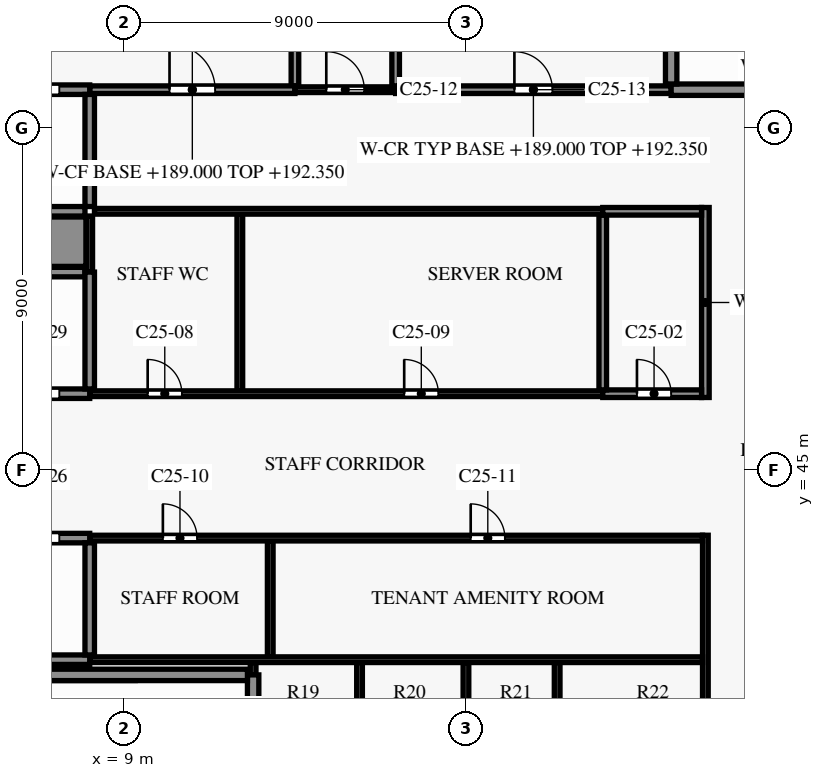
"""IFC4 building model, lengths in metres.
Left out: names, types, materials, properties, quantities, classifications, styles, units other than length and angle.
Written with IfcOpenShell. Run it as: python <this file> out.ifc"""

import sys

from ifc_helpers import new_model, si_unit, direction, frame, frame_2d, origin, place, context, subcontext, project, spatial, rectangle, extrude, element, fill, save


model = new_model("IFC4")
c1 = context("Model", 3, precision=1e-05, world=origin(), true_north=direction((0.0, 1.0)))
c2 = subcontext(c1, "Body", "Model", "MODEL_VIEW")
j1 = project(units=[si_unit("LENGTHUNIT", "METRE"), si_unit("PLANEANGLEUNIT", "RADIAN")], contexts=[c1])
p1 = place(None, origin())
s1 = spatial("IfcSite", under=j1, at=p1, CompositionType="ELEMENT")
p2 = place(p1, origin())
s2 = spatial("IfcBuilding", under=s1, at=p2, CompositionType="ELEMENT")
p3 = place(p2, frame((0.0, 0.0, 189.0)))
s3 = spatial("IfcBuildingStorey", under=s2, at=p3, CompositionType="ELEMENT", Elevation=189.0)
p4 = place(p3, frame((4.55, 39.6, 0.0), z_axis=(0.0, 0.0, 1.0), x_axis=(1.0, 0.0, 0.0)))
e1 = element("IfcWall", 1, at=p4, inside=s3, PredefinedType="SHEAR", context=c2, shape_type="SweptSolid", body=[
    extrude(rectangle(XDim=7.7, YDim=0.3, at=frame_2d((3.85, 0.0))), origin(), (0.0, 0.0, 1.0), 3.5),
])
p5 = place(p3, frame((8.1, 40.0, 0.0), z_axis=(0.0, 0.0, 1.0), x_axis=(1.0, 0.0, 0.0)))
e2 = element("IfcWall", 2, at=p5, inside=s3, PredefinedType="PARTITIONING", context=c2, shape_type="SweptSolid", body=[
    extrude(rectangle(XDim=16.125, YDim=0.15, at=frame_2d((8.062, 0.0))), origin(), (0.0, 0.0, 1.0), 3.35),
])
p6 = place(p3, frame((0.15, 40.0, 0.0), z_axis=(0.0, 0.0, 1.0), x_axis=(1.0, 0.0, 0.0)))
e3 = element("IfcWall", 3, at=p6, inside=s3, PredefinedType="SHEAR", context=c2, shape_type="SweptSolid", body=[
    extrude(rectangle(XDim=7.95, YDim=0.25, at=frame_2d((3.975, 0.0))), origin(), (0.0, 0.0, 1.0), 3.5),
])
p7 = place(p3, frame((8.1, 43.2, 0.0), z_axis=(0.0, 0.0, 1.0), x_axis=(1.0, 0.0, 0.0)))
e4 = element("IfcWall", 4, at=p7, inside=s3, PredefinedType="PARTITIONING", context=c2, shape_type="SweptSolid", body=[
    extrude(rectangle(XDim=16.125, YDim=0.15, at=frame_2d((8.062, 0.0))), origin(), (0.0, 0.0, 1.0), 3.35),
])
p8 = place(p7, frame((1.925, 0.0, 0.0)))
e5 = element("IfcOpeningElement", 5, at=p8, cuts=e4, PredefinedType="OPENING", context=c2, shape_type="SweptSolid", body=[
    extrude(rectangle(XDim=0.9, YDim=2.1, at=frame_2d((0.45, 1.05))), frame((0.0, 0.085, 0.0), z_axis=(0.0, -1.0, 0.0), x_axis=(1.0, 0.0, 0.0)), (0.0, 0.0, 1.0), 0.17),
])
p9 = place(p7, frame((10.025, 0.0, 0.0)))
e6 = element("IfcOpeningElement", 6, at=p9, cuts=e4, PredefinedType="OPENING", context=c2, shape_type="SweptSolid", body=[
    extrude(rectangle(XDim=0.9, YDim=2.1, at=frame_2d((0.45, 1.05))), frame((0.0, 0.085, 0.0), z_axis=(0.0, -1.0, 0.0), x_axis=(1.0, 0.0, 0.0)), (0.0, 0.0, 1.0), 0.17),
])
p10 = place(p3, frame((0.125, 43.2, 0.0), z_axis=(0.0, 0.0, 1.0), x_axis=(1.0, 0.0, 0.0)))
e7 = element("IfcWall", 7, at=p10, inside=s3, PredefinedType="SHEAR", context=c2, shape_type="SweptSolid", body=[
    extrude(rectangle(XDim=7.975, YDim=0.25, at=frame_2d((3.988, 0.0))), origin(), (0.0, 0.0, 1.0), 3.5),
])
p11 = place(p10, frame((0.675, 0.0, 0.0)))
e8 = element("IfcOpeningElement", 8, at=p11, cuts=e7, PredefinedType="OPENING", context=c2, shape_type="SweptSolid", body=[
    extrude(rectangle(XDim=1.1, YDim=2.1, at=frame_2d((0.55, 1.05))), frame((0.0, 0.135, 0.0), z_axis=(0.0, -1.0, 0.0), x_axis=(1.0, 0.0, 0.0)), (0.0, 0.0, 1.0), 0.27),
])
p12 = place(p10, frame((3.375, 0.0, 0.0)))
e9 = element("IfcOpeningElement", 9, at=p12, cuts=e7, PredefinedType="OPENING", context=c2, shape_type="SweptSolid", body=[
    extrude(rectangle(XDim=1.1, YDim=2.1, at=frame_2d((0.55, 1.05))), frame((0.0, 0.135, 0.0), z_axis=(0.0, -1.0, 0.0), x_axis=(1.0, 0.0, 0.0)), (0.0, 0.0, 1.0), 0.27),
])
p13 = place(p10, frame((6.075, 0.0, 0.0)))
e10 = element("IfcOpeningElement", 10, at=p13, cuts=e7, PredefinedType="OPENING", context=c2, shape_type="SweptSolid", body=[
    extrude(rectangle(XDim=1.1, YDim=2.1, at=frame_2d((0.55, 1.05))), frame((0.0, 0.135, 0.0), z_axis=(0.0, -1.0, 0.0), x_axis=(1.0, 0.0, 0.0)), (0.0, 0.0, 1.0), 0.27),
])
p14 = place(p3, frame((8.1, 47.0, 0.0), z_axis=(0.0, 0.0, 1.0), x_axis=(1.0, 0.0, 0.0)))
e11 = element("IfcWall", 11, at=p14, inside=s3, PredefinedType="PARTITIONING", context=c2, shape_type="SweptSolid", body=[
    extrude(rectangle(XDim=13.5, YDim=0.15, at=frame_2d((6.75, 0.0))), origin(), (0.0, 0.0, 1.0), 3.35),
])
p15 = place(p14, frame((1.525, 0.0, 0.0)))
e12 = element("IfcOpeningElement", 12, at=p15, cuts=e11, PredefinedType="OPENING", context=c2, shape_type="SweptSolid", body=[
    extrude(rectangle(XDim=0.9, YDim=2.1, at=frame_2d((0.45, 1.05))), frame((0.0, 0.085, 0.0), z_axis=(0.0, -1.0, 0.0), x_axis=(1.0, 0.0, 0.0)), (0.0, 0.0, 1.0), 0.17),
])
p16 = place(p14, frame((8.275, 0.0, 0.0)))
e13 = element("IfcOpeningElement", 13, at=p16, cuts=e11, PredefinedType="OPENING", context=c2, shape_type="SweptSolid", body=[
    extrude(rectangle(XDim=0.9, YDim=2.1, at=frame_2d((0.45, 1.05))), frame((0.0, 0.085, 0.0), z_axis=(0.0, -1.0, 0.0), x_axis=(1.0, 0.0, 0.0)), (0.0, 0.0, 1.0), 0.17),
])
p17 = place(p3, frame((21.6, 47.0, 0.0), z_axis=(0.0, 0.0, 1.0), x_axis=(1.0, 0.0, 0.0)))
e14 = element("IfcWall", 14, at=p17, inside=s3, PredefinedType="PARTITIONING", context=c2, shape_type="SweptSolid", body=[
    extrude(rectangle(XDim=2.6, YDim=0.2, at=frame_2d((1.3, 0.0))), origin(), (0.0, 0.0, 1.0), 3.35),
])
p18 = place(p17, frame((0.9, 0.0, 0.0)))
e15 = element("IfcOpeningElement", 15, at=p18, cuts=e14, PredefinedType="OPENING", context=c2, shape_type="SweptSolid", body=[
    extrude(rectangle(XDim=0.9, YDim=2.1, at=frame_2d((0.45, 1.05))), frame((0.0, 0.11, 0.0), z_axis=(0.0, -1.0, 0.0), x_axis=(1.0, 0.0, 0.0)), (0.0, 0.0, 1.0), 0.22),
])
p19 = place(p3, frame((0.125, 47.0, 0.0), z_axis=(0.0, 0.0, 1.0), x_axis=(1.0, 0.0, 0.0)))
e16 = element("IfcWall", 16, at=p19, inside=s3, PredefinedType="SHEAR", context=c2, shape_type="SweptSolid", body=[
    extrude(rectangle(XDim=7.975, YDim=0.25, at=frame_2d((3.988, 0.0))), origin(), (0.0, 0.0, 1.0), 3.5),
])
p20 = place(p19, frame((0.675, 0.0, 0.0)))
e17 = element("IfcOpeningElement", 17, at=p20, cuts=e16, PredefinedType="OPENING", context=c2, shape_type="SweptSolid", body=[
    extrude(rectangle(XDim=1.1, YDim=2.1, at=frame_2d((0.55, 1.05))), frame((0.0, 0.135, 0.0), z_axis=(0.0, -1.0, 0.0), x_axis=(1.0, 0.0, 0.0)), (0.0, 0.0, 1.0), 0.27),
])
p21 = place(p19, frame((3.375, 0.0, 0.0)))
e18 = element("IfcOpeningElement", 18, at=p21, cuts=e16, PredefinedType="OPENING", context=c2, shape_type="SweptSolid", body=[
    extrude(rectangle(XDim=1.1, YDim=2.1, at=frame_2d((0.55, 1.05))), frame((0.0, 0.135, 0.0), z_axis=(0.0, -1.0, 0.0), x_axis=(1.0, 0.0, 0.0)), (0.0, 0.0, 1.0), 0.27),
])
p22 = place(p19, frame((6.075, 0.0, 0.0)))
e19 = element("IfcOpeningElement", 19, at=p22, cuts=e16, PredefinedType="OPENING", context=c2, shape_type="SweptSolid", body=[
    extrude(rectangle(XDim=1.1, YDim=2.1, at=frame_2d((0.55, 1.05))), frame((0.0, 0.135, 0.0), z_axis=(0.0, -1.0, 0.0), x_axis=(1.0, 0.0, 0.0)), (0.0, 0.0, 1.0), 0.27),
])
p23 = place(p3, frame((0.125, 50.2, 0.0), z_axis=(0.0, 0.0, 1.0), x_axis=(1.0, 0.0, 0.0)))
e20 = element("IfcWall", 20, at=p23, inside=s3, PredefinedType="SHEAR", context=c2, shape_type="SweptSolid", body=[
    extrude(rectangle(XDim=7.85, YDim=0.25, at=frame_2d((3.925, 0.0))), origin(), (0.0, 0.0, 1.0), 3.5),
])
p24 = place(p3, frame((-0.125, 51.0, 0.0), z_axis=(0.0, 0.0, 1.0), x_axis=(1.0, 0.0, 0.0)))
e21 = element("IfcWall", 21, at=p24, inside=s3, PredefinedType="SHEAR", context=c2, shape_type="SweptSolid", body=[
    extrude(rectangle(XDim=8.125, YDim=1.3, at=frame_2d((4.062, 0.0))), origin(), (0.0, 0.0, 1.0), 3.5),
])
p25 = place(p3, frame((8.225, 51.8, 0.0), z_axis=(0.0, 0.0, 1.0), x_axis=(1.0, 0.0, 0.0)))
e22 = element("IfcWall", 22, at=p25, inside=s3, PredefinedType="PARTITIONING", context=c2, shape_type="SweptSolid", body=[
    extrude(rectangle(XDim=13.375, YDim=0.15, at=frame_2d((6.688, 0.0))), origin(), (0.0, 0.0, 1.0), 3.35),
])
p26 = place(p3, frame((21.6, 51.8, 0.0), z_axis=(0.0, 0.0, 1.0), x_axis=(1.0, 0.0, 0.0)))
e23 = element("IfcWall", 23, at=p26, inside=s3, PredefinedType="PARTITIONING", context=c2, shape_type="SweptSolid", body=[
    extrude(rectangle(XDim=2.6, YDim=0.2, at=frame_2d((1.3, 0.0))), origin(), (0.0, 0.0, 1.0), 3.35),
])
p27 = place(p3, frame((0.125, 51.8, 0.0), z_axis=(0.0, 0.0, 1.0), x_axis=(1.0, 0.0, 0.0)))
e24 = element("IfcWall", 24, at=p27, inside=s3, PredefinedType="SHEAR", context=c2, shape_type="SweptSolid", body=[
    extrude(rectangle(XDim=7.85, YDim=0.25, at=frame_2d((3.925, 0.0))), origin(), (0.0, 0.0, 1.0), 3.5),
])
p28 = place(p3, frame((8.1, 55.0, 0.0), z_axis=(0.0, 0.0, 1.0), x_axis=(1.0, 0.0, 0.0)))
e25 = element("IfcWall", 25, at=p28, inside=s3, PredefinedType="PARTITIONING", context=c2, shape_type="SweptSolid", body=[
    extrude(rectangle(XDim=5.4, YDim=0.2, at=frame_2d((2.7, 0.0))), origin(), (0.0, 0.0, 1.0), 3.35),
])
p29 = place(p28, frame((2.1, 0.0, 0.0)))
e26 = element("IfcOpeningElement", 26, at=p29, cuts=e25, PredefinedType="OPENING", context=c2, shape_type="SweptSolid", body=[
    extrude(rectangle(XDim=1.2, YDim=2.2, at=frame_2d((0.6, 1.1))), frame((0.0, 0.11, 0.0), z_axis=(0.0, -1.0, 0.0), x_axis=(1.0, 0.0, 0.0)), (0.0, 0.0, 1.0), 0.22),
])
p30 = place(p3, frame((13.5, 55.0, 0.0), z_axis=(0.0, 0.0, 1.0), x_axis=(1.0, 0.0, 0.0)))
e27 = element("IfcWall", 27, at=p30, inside=s3, PredefinedType="PARTITIONING", context=c2, shape_type="SweptSolid", body=[
    extrude(rectangle(XDim=2.65, YDim=0.15, at=frame_2d((1.325, 0.0))), origin(), (0.0, 0.0, 1.0), 3.35),
])
p31 = place(p30, frame((0.825, 0.0, 0.0)))
e28 = element("IfcOpeningElement", 28, at=p31, cuts=e27, PredefinedType="OPENING", context=c2, shape_type="SweptSolid", body=[
    extrude(rectangle(XDim=1.0, YDim=2.1, at=frame_2d((0.5, 1.05))), frame((0.0, 0.085, 0.0), z_axis=(0.0, -1.0, 0.0), x_axis=(1.0, 0.0, 0.0)), (0.0, 0.0, 1.0), 0.17),
])
p32 = place(p3, frame((16.15, 55.0, 0.0), z_axis=(0.0, 0.0, 1.0), x_axis=(1.0, 0.0, 0.0)))
e29 = element("IfcWall", 29, at=p32, inside=s3, PredefinedType="PARTITIONING", context=c2, shape_type="SweptSolid", body=[
    extrude(rectangle(XDim=7.25, YDim=0.2, at=frame_2d((3.625, 0.0))), origin(), (0.0, 0.0, 1.0), 3.35),
])
p33 = place(p32, frame((3.125, 0.0, 0.0)))
e30 = element("IfcOpeningElement", 30, at=p33, cuts=e29, PredefinedType="OPENING", context=c2, shape_type="SweptSolid", body=[
    extrude(rectangle(XDim=1.0, YDim=2.1, at=frame_2d((0.5, 1.05))), frame((0.0, 0.11, 0.0), z_axis=(0.0, -1.0, 0.0), x_axis=(1.0, 0.0, 0.0)), (0.0, 0.0, 1.0), 0.22),
])
p34 = place(p3, frame((0.15, 55.0, 0.0), z_axis=(0.0, 0.0, 1.0), x_axis=(1.0, 0.0, 0.0)))
e31 = element("IfcWall", 31, at=p34, inside=s3, PredefinedType="SHEAR", context=c2, shape_type="SweptSolid", body=[
    extrude(rectangle(XDim=7.95, YDim=0.25, at=frame_2d((3.975, 0.0))), origin(), (0.0, 0.0, 1.0), 3.5),
])
p35 = place(p34, frame((0.65, 0.0, 0.0)))
e32 = element("IfcOpeningElement", 32, at=p35, cuts=e31, PredefinedType="OPENING", context=c2, shape_type="SweptSolid", body=[
    extrude(rectangle(XDim=1.1, YDim=2.1, at=frame_2d((0.55, 1.05))), frame((0.0, 0.135, 0.0), z_axis=(0.0, -1.0, 0.0), x_axis=(1.0, 0.0, 0.0)), (0.0, 0.0, 1.0), 0.27),
])
p36 = place(p34, frame((3.35, 0.0, 0.0)))
e33 = element("IfcOpeningElement", 33, at=p36, cuts=e31, PredefinedType="OPENING", context=c2, shape_type="SweptSolid", body=[
    extrude(rectangle(XDim=1.1, YDim=2.1, at=frame_2d((0.55, 1.05))), frame((0.0, 0.135, 0.0), z_axis=(0.0, -1.0, 0.0), x_axis=(1.0, 0.0, 0.0)), (0.0, 0.0, 1.0), 0.27),
])
p37 = place(p34, frame((6.05, 0.0, 0.0)))
e34 = element("IfcOpeningElement", 34, at=p37, cuts=e31, PredefinedType="OPENING", context=c2, shape_type="SweptSolid", body=[
    extrude(rectangle(XDim=1.1, YDim=2.1, at=frame_2d((0.55, 1.05))), frame((0.0, 0.135, 0.0), z_axis=(0.0, -1.0, 0.0), x_axis=(1.0, 0.0, 0.0)), (0.0, 0.0, 1.0), 0.27),
])
p38 = place(p3, frame((23.4, 55.0, 0.0), z_axis=(0.0, 0.0, 1.0), x_axis=(1.0, 0.0, 0.0)))
e35 = element("IfcWall", 35, at=p38, inside=s3, PredefinedType="SHEAR", context=c2, shape_type="SweptSolid", body=[
    extrude(rectangle(XDim=3.45, YDim=0.3, at=frame_2d((1.725, 0.0))), origin(), (0.0, 0.0, 1.0), 3.5),
])
p39 = place(p3, frame((8.1, 50.2, 0.0), z_axis=(0.0, 0.0, 1.0), x_axis=(0.0, 1.0, 0.0)))
e36 = element("IfcWall", 36, at=p39, inside=s3, PredefinedType="PARTITIONING", context=c2, shape_type="SweptSolid", body=[
    extrude(rectangle(XDim=1.475, YDim=0.15, at=frame_2d((0.738, 0.0))), origin(), (0.0, 0.0, 1.0), 3.35),
])
p40 = place(p3, frame((8.1, 40.125, 0.0), z_axis=(0.0, 0.0, 1.0), x_axis=(0.0, 1.0, 0.0)))
e37 = element("IfcWall", 37, at=p40, inside=s3, PredefinedType="SHEAR", context=c2, shape_type="SweptSolid", body=[
    extrude(rectangle(XDim=2.95, YDim=0.25, at=frame_2d((1.475, 0.0))), origin(), (0.0, 0.0, 1.0), 3.5),
])
p41 = place(p3, frame((8.1, 47.125, 0.0), z_axis=(0.0, 0.0, 1.0), x_axis=(0.0, 1.0, 0.0)))
e38 = element("IfcWall", 38, at=p41, inside=s3, PredefinedType="SHEAR", context=c2, shape_type="SweptSolid", body=[
    extrude(rectangle(XDim=3.075, YDim=0.25, at=frame_2d((1.538, 0.0))), origin(), (0.0, 0.0, 1.0), 3.5),
])
p42 = place(p3, frame((8.1, 51.925, 0.0), z_axis=(0.0, 0.0, 1.0), x_axis=(0.0, 1.0, 0.0)))
e39 = element("IfcWall", 39, at=p42, inside=s3, PredefinedType="SHEAR", context=c2, shape_type="SweptSolid", body=[
    extrude(rectangle(XDim=2.95, YDim=0.25, at=frame_2d((1.475, 0.0))), origin(), (0.0, 0.0, 1.0), 3.5),
])
p43 = place(p3, frame((12.05, 47.075, 0.0), z_axis=(0.0, 0.0, 1.0), x_axis=(0.0, 1.0, 0.0)))
e40 = element("IfcWall", 40, at=p43, inside=s3, PredefinedType="PARTITIONING", context=c2, shape_type="SweptSolid", body=[
    extrude(rectangle(XDim=4.65, YDim=0.15, at=frame_2d((2.325, 0.0))), origin(), (0.0, 0.0, 1.0), 3.35),
])
p44 = place(p3, frame((12.4, 39.6, 0.0), z_axis=(0.0, 0.0, 1.0), x_axis=(0.0, 1.0, 0.0)))
e41 = element("IfcWall", 41, at=p44, inside=s3, PredefinedType="PARTITIONING", context=c2, shape_type="SweptSolid", body=[
    extrude(rectangle(XDim=0.325, YDim=0.15, at=frame_2d((0.163, 0.0))), origin(), (0.0, 0.0, 1.0), 3.35),
])
p45 = place(p3, frame((12.4, 36.15, 0.0), z_axis=(0.0, 0.0, 1.0), x_axis=(0.0, 1.0, 0.0)))
e42 = element("IfcWall", 42, at=p45, inside=s3, PredefinedType="SHEAR", context=c2, shape_type="SweptSolid", body=[
    extrude(rectangle(XDim=3.45, YDim=0.3, at=frame_2d((1.725, 0.0))), origin(), (0.0, 0.0, 1.0), 3.5),
])
p46 = place(p3, frame((12.85, 40.075, 0.0), z_axis=(0.0, 0.0, 1.0), x_axis=(0.0, 1.0, 0.0)))
e43 = element("IfcWall", 43, at=p46, inside=s3, PredefinedType="PARTITIONING", context=c2, shape_type="SweptSolid", body=[
    extrude(rectangle(XDim=3.05, YDim=0.15, at=frame_2d((1.525, 0.0))), origin(), (0.0, 0.0, 1.0), 3.35),
])
p47 = place(p3, frame((13.5, 55.1, 0.0), z_axis=(0.0, 0.0, 1.0), x_axis=(0.0, 1.0, 0.0)))
e44 = element("IfcWall", 44, at=p47, inside=s3, PredefinedType="PARTITIONING", context=c2, shape_type="SweptSolid", body=[
    extrude(rectangle(XDim=3.9, YDim=0.2, at=frame_2d((1.95, 0.0))), origin(), (0.0, 0.0, 1.0), 3.35),
])
p48 = place(p3, frame((15.2, 36.075, 0.0), z_axis=(0.0, 0.0, 1.0), x_axis=(0.0, 1.0, 0.0)))
e45 = element("IfcWall", 45, at=p48, inside=s3, PredefinedType="PARTITIONING", context=c2, shape_type="SweptSolid", body=[
    extrude(rectangle(XDim=3.85, YDim=0.15, at=frame_2d((1.925, 0.0))), origin(), (0.0, 0.0, 1.0), 3.35),
])
p49 = place(p3, frame((16.15, 55.1, 0.0), z_axis=(0.0, 0.0, 1.0), x_axis=(0.0, 1.0, 0.0)))
e46 = element("IfcWall", 46, at=p49, inside=s3, PredefinedType="PARTITIONING", context=c2, shape_type="SweptSolid", body=[
    extrude(rectangle(XDim=7.05, YDim=0.2, at=frame_2d((3.525, 0.0))), origin(), (0.0, 0.0, 1.0), 3.35),
])
for number, where, z_axis, x_axis in (
    (47, (18.0, 36.075, 0.0), (0.0, 0.0, 1.0), (0.0, 1.0, 0.0)),
    (48, (20.4, 36.075, 0.0), (0.0, 0.0, 1.0), (0.0, 1.0, 0.0)),
):
    element("IfcWall", number, at=place(p3, frame(where, z_axis=z_axis, x_axis=x_axis)), inside=s3, PredefinedType="PARTITIONING", context=c2, shape_type="SweptSolid", body=[
        extrude(rectangle(XDim=3.85, YDim=0.15, at=frame_2d((1.925, 0.0))), origin(), (0.0, 0.0, 1.0), 3.35),
    ])
p50 = place(p3, frame((21.6, 47.1, 0.0), z_axis=(0.0, 0.0, 1.0), x_axis=(0.0, 1.0, 0.0)))
e49 = element("IfcWall", 49, at=p50, inside=s3, PredefinedType="PARTITIONING", context=c2, shape_type="SweptSolid", body=[
    extrude(rectangle(XDim=4.6, YDim=0.2, at=frame_2d((2.3, 0.0))), origin(), (0.0, 0.0, 1.0), 3.35),
])
p51 = place(p3, frame((23.4, 55.15, 0.0), z_axis=(0.0, 0.0, 1.0), x_axis=(0.0, 1.0, 0.0)))
e50 = element("IfcWall", 50, at=p51, inside=s3, PredefinedType="SHEAR", context=c2, shape_type="SweptSolid", body=[
    extrude(rectangle(XDim=8.0, YDim=0.3, at=frame_2d((4.0, 0.0))), origin(), (0.0, 0.0, 1.0), 3.5),
])
p52 = place(p3, frame((24.3, 35.925, 0.0), z_axis=(0.0, 0.0, 1.0), x_axis=(0.0, 1.0, 0.0)))
e51 = element("IfcWall", 51, at=p52, inside=s3, PredefinedType="PARTITIONING", context=c2, shape_type="SweptSolid", body=[
    extrude(rectangle(XDim=7.35, YDim=0.15, at=frame_2d((3.675, 0.0))), origin(), (0.0, 0.0, 1.0), 3.35),
])
p53 = place(p3, frame((24.3, 46.9, 0.0), z_axis=(0.0, 0.0, 1.0), x_axis=(0.0, 1.0, 0.0)))
e52 = element("IfcWall", 52, at=p53, inside=s3, PredefinedType="SHEAR", context=c2, shape_type="SweptSolid", body=[
    extrude(rectangle(XDim=5.0, YDim=0.2, at=frame_2d((2.5, 0.0))), origin(), (0.0, 0.0, 1.0), 3.5),
])
p54 = place(p29, origin())
e53 = element("IfcDoor", 53, at=p54, inside=s3, OperationType="SINGLE_SWING_RIGHT", PredefinedType="DOOR", context=c2, shape_type="SweptSolid", body=[
    extrude(rectangle(XDim=1.2, YDim=2.2, at=frame_2d((0.6, 1.1))), frame((0.0, 0.025, 0.0), z_axis=(0.0, -1.0, 0.0), x_axis=(1.0, 0.0, 0.0)), (0.0, 0.0, 1.0), 0.05),
])
fill(e26, e53)
p55 = place(p18, origin())
e54 = element("IfcDoor", 54, at=p55, inside=s3, OperationType="SINGLE_SWING_LEFT", PredefinedType="DOOR", context=c2, shape_type="SweptSolid", body=[
    extrude(rectangle(XDim=0.9, YDim=2.1, at=frame_2d((0.45, 1.05))), frame((0.0, 0.025, 0.0), z_axis=(0.0, -1.0, 0.0), x_axis=(1.0, 0.0, 0.0)), (0.0, 0.0, 1.0), 0.05),
])
fill(e15, e54)
p56 = place(p15, origin())
e55 = element("IfcDoor", 55, at=p56, inside=s3, OperationType="SINGLE_SWING_LEFT", PredefinedType="DOOR", context=c2, shape_type="SweptSolid", body=[
    extrude(rectangle(XDim=0.9, YDim=2.1, at=frame_2d((0.45, 1.05))), frame((0.0, 0.025, 0.0), z_axis=(0.0, -1.0, 0.0), x_axis=(1.0, 0.0, 0.0)), (0.0, 0.0, 1.0), 0.05),
])
fill(e12, e55)
p57 = place(p16, origin())
e56 = element("IfcDoor", 56, at=p57, inside=s3, OperationType="SINGLE_SWING_RIGHT", PredefinedType="DOOR", context=c2, shape_type="SweptSolid", body=[
    extrude(rectangle(XDim=0.9, YDim=2.1, at=frame_2d((0.45, 1.05))), frame((0.0, 0.025, 0.0), z_axis=(0.0, -1.0, 0.0), x_axis=(1.0, 0.0, 0.0)), (0.0, 0.0, 1.0), 0.05),
])
fill(e13, e56)
p58 = place(p8, origin())
e57 = element("IfcDoor", 57, at=p58, inside=s3, OperationType="SINGLE_SWING_RIGHT", PredefinedType="DOOR", context=c2, shape_type="SweptSolid", body=[
    extrude(rectangle(XDim=0.9, YDim=2.1, at=frame_2d((0.45, 1.05))), frame((0.0, 0.025, 0.0), z_axis=(0.0, -1.0, 0.0), x_axis=(1.0, 0.0, 0.0)), (0.0, 0.0, 1.0), 0.05),
])
fill(e5, e57)
p59 = place(p9, origin())
e58 = element("IfcDoor", 58, at=p59, inside=s3, OperationType="SINGLE_SWING_LEFT", PredefinedType="DOOR", context=c2, shape_type="SweptSolid", body=[
    extrude(rectangle(XDim=0.9, YDim=2.1, at=frame_2d((0.45, 1.05))), frame((0.0, 0.025, 0.0), z_axis=(0.0, -1.0, 0.0), x_axis=(1.0, 0.0, 0.0)), (0.0, 0.0, 1.0), 0.05),
])
fill(e6, e58)
p60 = place(p31, origin())
e59 = element("IfcDoor", 59, at=p60, inside=s3, OperationType="SINGLE_SWING_LEFT", PredefinedType="DOOR", context=c2, shape_type="SweptSolid", body=[
    extrude(rectangle(XDim=1.0, YDim=2.1, at=frame_2d((0.5, 1.05))), frame((0.0, 0.025, 0.0), z_axis=(0.0, -1.0, 0.0), x_axis=(1.0, 0.0, 0.0)), (0.0, 0.0, 1.0), 0.05),
])
fill(e28, e59)
p61 = place(p33, origin())
e60 = element("IfcDoor", 60, at=p61, inside=s3, OperationType="SINGLE_SWING_RIGHT", PredefinedType="DOOR", context=c2, shape_type="SweptSolid", body=[
    extrude(rectangle(XDim=1.0, YDim=2.1, at=frame_2d((0.5, 1.05))), frame((0.0, 0.025, 0.0), z_axis=(0.0, -1.0, 0.0), x_axis=(1.0, 0.0, 0.0)), (0.0, 0.0, 1.0), 0.05),
])
fill(e30, e60)
p62 = place(p37, origin())
e61 = element("IfcDoor", 61, at=p62, inside=s3, OperationType="DOUBLE_DOOR_SLIDING", PredefinedType="DOOR", context=c2, shape_type="SweptSolid", body=[
    extrude(rectangle(XDim=1.1, YDim=2.1, at=frame_2d((0.55, 1.05))), frame((0.0, 0.025, 0.0), z_axis=(0.0, -1.0, 0.0), x_axis=(1.0, 0.0, 0.0)), (0.0, 0.0, 1.0), 0.05),
])
fill(e34, e61)
p63 = place(p13, origin())
e62 = element("IfcDoor", 62, at=p63, inside=s3, OperationType="DOUBLE_DOOR_SLIDING", PredefinedType="DOOR", context=c2, shape_type="SweptSolid", body=[
    extrude(rectangle(XDim=1.1, YDim=2.1, at=frame_2d((0.55, 1.05))), frame((0.0, 0.025, 0.0), z_axis=(0.0, -1.0, 0.0), x_axis=(1.0, 0.0, 0.0)), (0.0, 0.0, 1.0), 0.05),
])
fill(e10, e62)
p64 = place(p22, origin())
e63 = element("IfcDoor", 63, at=p64, inside=s3, OperationType="DOUBLE_DOOR_SLIDING", PredefinedType="DOOR", context=c2, shape_type="SweptSolid", body=[
    extrude(rectangle(XDim=1.1, YDim=2.1, at=frame_2d((0.55, 1.05))), frame((0.0, 0.025, 0.0), z_axis=(0.0, -1.0, 0.0), x_axis=(1.0, 0.0, 0.0)), (0.0, 0.0, 1.0), 0.05),
])
fill(e19, e63)
save(model, sys.argv[1])
